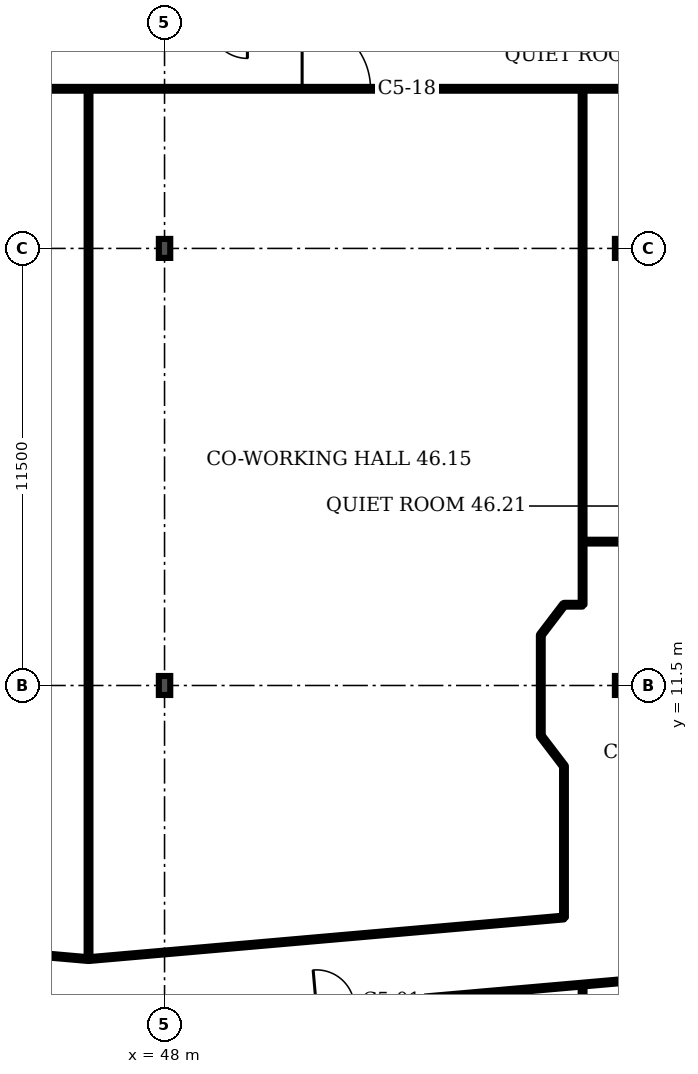
"""IFC4 building model, lengths in metres.
Left out: names, types, materials, properties, quantities, classifications, styles, units other than length and angle.
Written with IfcOpenShell. Run it as: python <this file> out.ifc"""

import sys

from ifc_helpers import new_model, si_unit, direction, frame, frame_2d, origin, origin_2d, place, context, subcontext, project, spatial, rectangle, i_section, extrude, element, fill, save


model = new_model("IFC4")
c1 = context("Model", 3, precision=1e-05, world=origin(), true_north=direction((0.0, 1.0)))
c2 = subcontext(c1, "Body", "Model", "MODEL_VIEW")
j1 = project(units=[si_unit("LENGTHUNIT", "METRE"), si_unit("PLANEANGLEUNIT", "RADIAN")], contexts=[c1])
p1 = place(None, origin())
s1 = spatial("IfcSite", under=j1, at=p1, CompositionType="ELEMENT")
p2 = place(p1, origin())
s2 = spatial("IfcBuilding", under=s1, at=p2, CompositionType="ELEMENT")
p3 = place(p2, frame((0.0, 0.0, 187.9)))
s3 = spatial("IfcBuildingStorey", under=s2, at=p3, CompositionType="ELEMENT", Elevation=187.9)
for number, where, z_axis, x_axis in (
    (1, (48.0, 11.5, 0.0), (0.0, 0.0, 1.0), (1.0, 0.0, 0.0)),
    (2, (60.0, 11.5, 0.0), (0.0, 0.0, 1.0), (1.0, 0.0, 0.0)),
    (3, (48.0, 23.0, 0.0), (0.0, 0.0, 1.0), (1.0, 0.0, 0.0)),
    (4, (60.0, 23.0, 0.0), (0.0, 0.0, 1.0), (1.0, 0.0, 0.0)),
):
    element("IfcColumn", number, at=place(p3, frame(where, z_axis=z_axis, x_axis=x_axis)), inside=s3, PredefinedType="COLUMN", context=c2, shape_type="SweptSolid", body=[
        extrude(i_section(OverallWidth=0.3, OverallDepth=0.5, WebThickness=0.014, FlangeThickness=0.028, FilletRadius=0.027, at=origin_2d()), origin(), (0.0, 0.0, 1.0), 3.6),
    ])
p4 = place(p3, frame((19.3, 27.2, 0.0), z_axis=(0.0, 0.0, 1.0), x_axis=(1.0, 0.0, 0.0)))
e5 = element("IfcWall", 5, at=p4, inside=s3, PredefinedType="PARTITIONING", context=c2, shape_type="SweptSolid", body=[
    extrude(rectangle(XDim=41.305, YDim=0.1, at=frame_2d((20.652, 0.0))), origin(), (0.0, 0.0, 1.0), 3.2),
])
p5 = place(p4, frame((32.32, 0.0, 0.0)))
e6 = element("IfcOpeningElement", 6, at=p5, cuts=e5, PredefinedType="OPENING", context=c2, shape_type="SweptSolid", body=[
    extrude(rectangle(XDim=1.8, YDim=2.1, at=frame_2d((0.9, 1.05))), frame((0.0, 0.06, 0.0), z_axis=(0.0, -1.0, 0.0), x_axis=(1.0, 0.0, 0.0)), (0.0, 0.0, 1.0), 0.12),
])
p6 = place(p3, frame((46.0, 4.3, 0.0), z_axis=(0.0, 0.0, 1.0), x_axis=(-0.996173, 0.087448, 0.0)))
e7 = element("IfcWall", 7, at=p6, inside=s3, PredefinedType="PARTITIONING", context=c2, shape_type="SweptSolid", body=[
    extrude(rectangle(XDim=7.315, YDim=0.1, at=frame_2d((3.657, 0.0))), origin(), (0.0, 0.0, 1.0), 3.2),
])
p7 = place(p3, frame((46.0, 2.495, 0.0), z_axis=(0.0, 0.0, 1.0), x_axis=(-0.996214, 0.08693, 0.0)))
e8 = element("IfcWall", 8, at=p7, inside=s3, PredefinedType="PARTITIONING", context=c2, shape_type="SweptSolid", body=[
    extrude(rectangle(XDim=11.503, YDim=0.1, at=frame_2d((5.752, 0.0))), origin(), (0.0, 0.0, 1.0), 3.2),
])
p8 = place(p7, frame((8.642, 0.0, 0.0)))
e9 = element("IfcOpeningElement", 9, at=p8, cuts=e8, PredefinedType="OPENING", context=c2, shape_type="SweptSolid", body=[
    extrude(rectangle(XDim=1.0, YDim=2.1, at=frame_2d((0.5, 1.05))), frame((0.0, 0.06, 0.0), z_axis=(0.0, -1.0, 0.0), x_axis=(1.0, 0.0, 0.0)), (0.0, 0.0, 1.0), 0.12),
])
p9 = place(p3, frame((46.0, 4.3, 0.0), z_axis=(0.0, 0.0, 1.0), x_axis=(0.0, 1.0, 0.0)))
e10 = element("IfcWall", 10, at=p9, inside=s3, PredefinedType="PARTITIONING", context=c2, shape_type="SweptSolid", body=[
    extrude(rectangle(XDim=22.9, YDim=0.1, at=frame_2d((11.45, 0.0))), origin(), (0.0, 0.0, 1.0), 3.2),
])
p10 = place(p3, frame((46.0, 4.3, 0.0), z_axis=(0.0, 0.0, 1.0), x_axis=(0.996189, 0.087194, 0.0)))
e11 = element("IfcWall", 11, at=p10, inside=s3, PredefinedType="PARTITIONING", context=c2, shape_type="SweptSolid", body=[
    extrude(rectangle(XDim=12.558, YDim=0.1, at=frame_2d((6.279, 0.0))), origin(), (0.0, 0.0, 1.0), 3.2),
])
p11 = place(p3, frame((48.265, 2.69, 0.0), z_axis=(0.0, 0.0, 1.0), x_axis=(0.996187, 0.087229, 0.0)))
e12 = element("IfcWall", 12, at=p11, inside=s3, PredefinedType="PARTITIONING", context=c2, shape_type="SweptSolid", body=[
    extrude(rectangle(XDim=12.091, YDim=0.1, at=frame_2d((6.045, 0.0))), origin(), (0.0, 0.0, 1.0), 3.2),
])
p12 = place(p11, frame((3.747, 0.0, 0.0)))
e13 = element("IfcOpeningElement", 13, at=p12, cuts=e12, PredefinedType="OPENING", context=c2, shape_type="SweptSolid", body=[
    extrude(rectangle(XDim=1.0, YDim=2.1, at=frame_2d((0.5, 1.05))), frame((0.0, 0.06, 0.0), z_axis=(0.0, -1.0, 0.0), x_axis=(1.0, 0.0, 0.0)), (0.0, 0.0, 1.0), 0.12),
])
p13 = place(p3, frame((57.9, 10.175, 0.0), z_axis=(0.0, 0.0, 1.0), x_axis=(0.0, 1.0, 0.0)))
e14 = element("IfcWall", 14, at=p13, inside=s3, PredefinedType="PARTITIONING", context=c2, shape_type="SweptSolid", body=[
    extrude(rectangle(XDim=2.65, YDim=0.1, at=frame_2d((1.325, 0.0))), origin(), (0.0, 0.0, 1.0), 3.2),
])
for number, where, z_axis, x_axis in (
    (15, (57.9, 12.825, 0.0), (0.0, 0.0, 1.0), (0.606, 0.795, 0.0)),
    (16, (58.51, 9.375, 0.0), (0.0, 0.0, 1.0), (-0.606, 0.795, 0.0)),
):
    element("IfcWall", number, at=place(p3, frame(where, z_axis=z_axis, x_axis=x_axis)), inside=s3, PredefinedType="PARTITIONING", context=c2, shape_type="SweptSolid", body=[
        extrude(rectangle(XDim=1.006, YDim=0.1, at=frame_2d((0.503, 0.0))), origin(), (0.0, 0.0, 1.0), 3.2),
    ])
p14 = place(p3, frame((58.51, 5.395, 0.0), z_axis=(0.0, 0.0, 1.0), x_axis=(0.0, 1.0, 0.0)))
e17 = element("IfcWall", 17, at=p14, inside=s3, PredefinedType="PARTITIONING", context=c2, shape_type="SweptSolid", body=[
    extrude(rectangle(XDim=3.98, YDim=0.1, at=frame_2d((1.99, 0.0))), origin(), (0.0, 0.0, 1.0), 3.2),
])
p15 = place(p3, frame((58.51, 13.625, 0.0), z_axis=(0.0, 0.0, 1.0), x_axis=(1.0, 0.0, 0.0)))
e18 = element("IfcWall", 18, at=p15, inside=s3, PredefinedType="PARTITIONING", context=c2, shape_type="SweptSolid", body=[
    extrude(rectangle(XDim=0.49, YDim=0.1, at=frame_2d((0.245, 0.0))), origin(), (0.0, 0.0, 1.0), 3.2),
])
p16 = place(p3, frame((59.0, 2.545, 0.0), z_axis=(0.0, 0.0, 1.0), x_axis=(0.0, 1.0, 0.0)))
e19 = element("IfcWall", 19, at=p16, inside=s3, PredefinedType="PARTITIONING", context=c2, shape_type="SweptSolid", body=[
    extrude(rectangle(XDim=1.085, YDim=0.1, at=frame_2d((0.542, 0.0))), origin(), (0.0, 0.0, 1.0), 3.2),
])
p17 = place(p3, frame((59.0, 13.625, 0.0), z_axis=(0.0, 0.0, 1.0), x_axis=(0.0, 1.0, 0.0)))
e20 = element("IfcWall", 20, at=p17, inside=s3, PredefinedType="PARTITIONING", context=c2, shape_type="SweptSolid", body=[
    extrude(rectangle(XDim=13.575, YDim=0.1, at=frame_2d((6.788, 0.0))), origin(), (0.0, 0.0, 1.0), 3.2),
])
p18 = place(p3, frame((59.0, 15.285, 0.0), z_axis=(0.0, 0.0, 1.0), x_axis=(1.0, 0.0, 0.0)))
e21 = element("IfcWall", 21, at=p18, inside=s3, PredefinedType="PARTITIONING", context=c2, shape_type="SweptSolid", body=[
    extrude(rectangle(XDim=13.0, YDim=0.1, at=frame_2d((6.5, 0.0))), origin(), (0.0, 0.0, 1.0), 3.2),
])
p19 = place(p18, frame((5.98, 0.0, 0.0)))
e22 = element("IfcOpeningElement", 22, at=p19, cuts=e21, PredefinedType="OPENING", context=c2, shape_type="SweptSolid", body=[
    extrude(rectangle(XDim=1.0, YDim=2.1, at=frame_2d((0.5, 1.05))), frame((0.0, 0.06, 0.0), z_axis=(0.0, -1.0, 0.0), x_axis=(1.0, 0.0, 0.0)), (0.0, 0.0, 1.0), 0.12),
])
p20 = place(p5, origin())
e23 = element("IfcDoor", 23, at=p20, inside=s3, OperationType="DOUBLE_DOOR_SINGLE_SWING", PredefinedType="DOOR", context=c2, shape_type="SweptSolid", body=[
    extrude(rectangle(XDim=1.8, YDim=2.1, at=frame_2d((0.9, 1.05))), frame((0.0, 0.025, 0.0), z_axis=(0.0, -1.0, 0.0), x_axis=(1.0, 0.0, 0.0)), (0.0, 0.0, 1.0), 0.05),
])
fill(e6, e23)
save(model, sys.argv[1])
